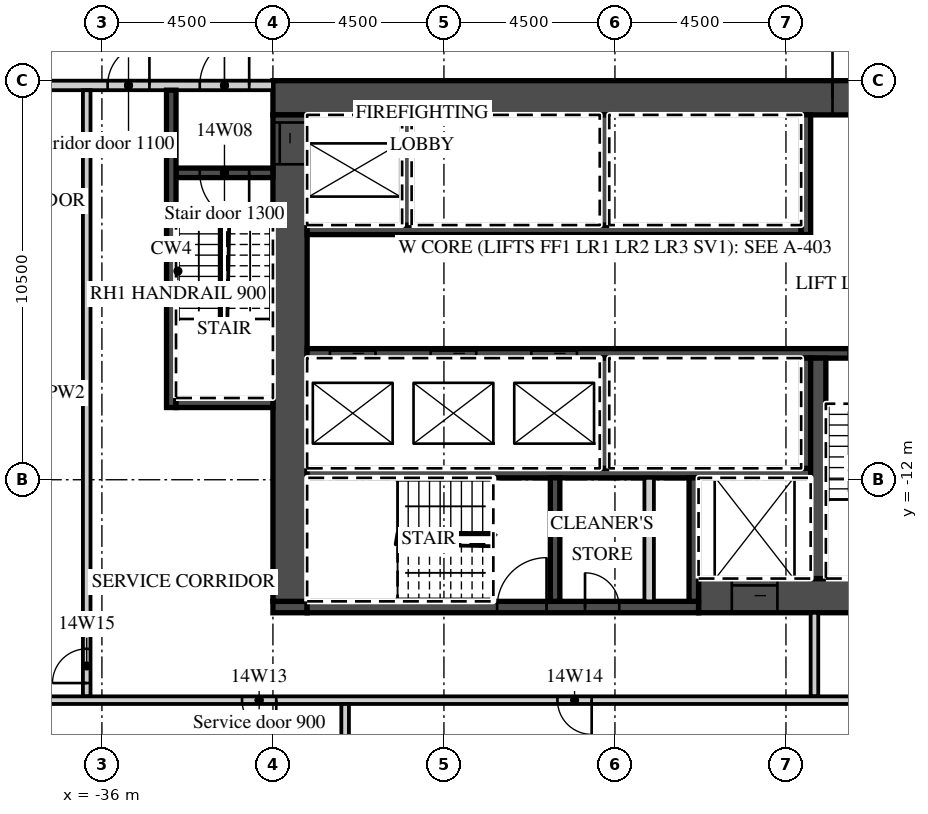
"""IFC4 building model, lengths in metres.
Left out: names, types, materials, properties, quantities, classifications, styles, units other than length and angle.
Written with IfcOpenShell. Run it as: python <this file> out.ifc"""

import sys

from ifc_helpers import new_model, si_unit, direction, frame, frame_2d, origin, place, context, subcontext, project, spatial, rectangle, extrude, element, fill, save


model = new_model("IFC4")
c1 = context("Model", 3, precision=1e-05, world=origin(), true_north=direction((0.0, 1.0)))
c2 = subcontext(c1, "Body", "Model", "MODEL_VIEW")
j1 = project(units=[si_unit("LENGTHUNIT", "METRE"), si_unit("PLANEANGLEUNIT", "RADIAN")], contexts=[c1])
p1 = place(None, origin())
s1 = spatial("IfcSite", under=j1, at=p1, CompositionType="ELEMENT")
p2 = place(p1, origin())
s2 = spatial("IfcBuilding", under=s1, at=p2, CompositionType="ELEMENT")
p3 = place(p2, frame((0.0, 0.0, 76.5)))
s3 = spatial("IfcBuildingStorey", under=s2, at=p3, CompositionType="ELEMENT", Elevation=76.5)
p4 = place(p3, frame((-31.5, -1.95, 0.0), z_axis=(0.0, 0.0, 1.0), x_axis=(1.0, 0.0, 0.0)))
e1 = element("IfcWall", 1, at=p4, inside=s3, PredefinedType="SHEAR", context=c2, shape_type="SweptSolid", body=[
    extrude(rectangle(XDim=18.0, YDim=0.9, at=frame_2d((9.0, 0.0))), origin(), (0.0, 0.0, 1.0), 3.02),
])
p5 = place(p4, frame((14.725, 0.0, 0.0)))
e2 = element("IfcOpeningElement", 2, at=p5, cuts=e1, PredefinedType="OPENING", context=c2, shape_type="SweptSolid", body=[
    extrude(rectangle(XDim=1.8, YDim=2.1, at=frame_2d((0.9, 1.05))), frame((0.0, 0.46, 0.0), z_axis=(0.0, -1.0, 0.0), x_axis=(1.0, 0.0, 0.0)), (0.0, 0.0, 1.0), 0.92),
])
p6 = place(p3, frame((-20.3, -15.05, 0.0), z_axis=(0.0, 0.0, 1.0), x_axis=(1.0, 0.0, 0.0)))
e3 = element("IfcWall", 3, at=p6, inside=s3, PredefinedType="SHEAR", context=c2, shape_type="SweptSolid", body=[
    extrude(rectangle(XDim=6.8, YDim=0.9, at=frame_2d((3.4, 0.0))), origin(), (0.0, 0.0, 1.0), 3.02),
])
p7 = place(p6, frame((0.875, 0.0, 0.0)))
e4 = element("IfcOpeningElement", 4, at=p7, cuts=e3, PredefinedType="OPENING", context=c2, shape_type="SweptSolid", body=[
    extrude(rectangle(XDim=1.2, YDim=2.1, at=frame_2d((0.6, 1.05))), frame((0.0, 0.46, 0.0), z_axis=(0.0, -1.0, 0.0), x_axis=(1.0, 0.0, 0.0)), (0.0, 0.0, 1.0), 0.92),
])
p8 = place(p3, frame((-31.5, -15.35, 0.0), z_axis=(0.0, 0.0, 1.0), x_axis=(1.0, 0.0, 0.0)))
e5 = element("IfcWall", 5, at=p8, inside=s3, PredefinedType="SHEAR", context=c2, shape_type="SweptSolid", body=[
    extrude(rectangle(XDim=0.9, YDim=0.3, at=frame_2d((0.45, 0.0))), origin(), (0.0, 0.0, 1.0), 3.02),
])
p9 = place(p3, frame((-30.6, -15.35, 0.0), z_axis=(0.0, 0.0, 1.0), x_axis=(1.0, 0.0, 0.0)))
e6 = element("IfcWall", 6, at=p9, inside=s3, PredefinedType="SHEAR", context=c2, shape_type="SweptSolid", body=[
    extrude(rectangle(XDim=10.3, YDim=0.3, at=frame_2d((5.15, 0.0))), origin(), (0.0, 0.0, 1.0), 3.02),
])
p10 = place(p9, frame((5.0, 0.0, 0.0)))
e7 = element("IfcOpeningElement", 7, at=p10, cuts=e6, PredefinedType="OPENING", context=c2, shape_type="SweptSolid", body=[
    extrude(rectangle(XDim=1.3, YDim=2.1, at=frame_2d((0.65, 1.05))), frame((0.0, 0.16, 0.0), z_axis=(0.0, -1.0, 0.0), x_axis=(1.0, 0.0, 0.0)), (0.0, 0.0, 1.0), 0.32),
])
p11 = place(p9, frame((7.312, 0.0, 0.0)))
e8 = element("IfcOpeningElement", 8, at=p11, cuts=e6, PredefinedType="OPENING", context=c2, shape_type="SweptSolid", body=[
    extrude(rectangle(XDim=0.9, YDim=2.1, at=frame_2d((0.45, 1.05))), frame((0.0, 0.16, 0.0), z_axis=(0.0, -1.0, 0.0), x_axis=(1.0, 0.0, 0.0)), (0.0, 0.0, 1.0), 0.32),
])
p12 = place(p3, frame((-31.05, -15.2, 0.0), z_axis=(0.0, 0.0, 1.0), x_axis=(0.0, 1.0, 0.0)))
e9 = element("IfcWall", 9, at=p12, inside=s3, PredefinedType="SHEAR", context=c2, shape_type="SweptSolid", body=[
    extrude(rectangle(XDim=12.8, YDim=0.9, at=frame_2d((6.4, 0.0))), origin(), (0.0, 0.0, 1.0), 3.02),
])
p13 = place(p12, frame((11.5, 0.0, 0.0)))
e10 = element("IfcOpeningElement", 10, at=p13, cuts=e9, PredefinedType="OPENING", context=c2, shape_type="SweptSolid", body=[
    extrude(rectangle(XDim=1.1, YDim=2.1, at=frame_2d((0.55, 1.05))), frame((0.0, 0.46, 0.0), z_axis=(0.0, -1.0, 0.0), x_axis=(1.0, 0.0, 0.0)), (0.0, 0.0, 1.0), 0.92),
])
p14 = place(p3, frame((-30.6, -5.425, 0.0), z_axis=(0.0, 0.0, 1.0), x_axis=(1.0, 0.0, 0.0)))
e11 = element("IfcWall", 11, at=p14, inside=s3, PredefinedType="SHEAR", context=c2, shape_type="SweptSolid", body=[
    extrude(rectangle(XDim=13.0, YDim=0.25, at=frame_2d((6.5, 0.0))), origin(), (0.0, 0.0, 1.0), 3.02),
])
p15 = place(p3, frame((-17.475, -5.55, 0.0), z_axis=(0.0, 0.0, 1.0), x_axis=(0.0, 1.0, 0.0)))
e12 = element("IfcWall", 12, at=p15, inside=s3, PredefinedType="SHEAR", context=c2, shape_type="SweptSolid", body=[
    extrude(rectangle(XDim=3.15, YDim=0.25, at=frame_2d((1.575, 0.0))), origin(), (0.0, 0.0, 1.0), 3.02),
])
for number, where, z_axis, x_axis in (
    (13, (-27.975, -5.3, 0.0), (0.0, 0.0, 1.0), (0.0, 1.0, 0.0)),
    (14, (-22.775, -5.3, 0.0), (0.0, 0.0, 1.0), (0.0, 1.0, 0.0)),
):
    element("IfcWall", number, at=place(p3, frame(where, z_axis=z_axis, x_axis=x_axis)), inside=s3, PredefinedType="SHEAR", context=c2, shape_type="SweptSolid", body=[
        extrude(rectangle(XDim=2.9, YDim=0.25, at=frame_2d((1.45, 0.0))), origin(), (0.0, 0.0, 1.0), 3.02),
    ])
p16 = place(p3, frame((-30.6, -8.675, 0.0), z_axis=(0.0, 0.0, 1.0), x_axis=(1.0, 0.0, 0.0)))
e15 = element("IfcWall", 15, at=p16, inside=s3, PredefinedType="SHEAR", context=c2, shape_type="SweptSolid", body=[
    extrude(rectangle(XDim=16.2, YDim=0.25, at=frame_2d((8.1, 0.0))), origin(), (0.0, 0.0, 1.0), 3.02),
])
p17 = place(p16, frame((0.6, 0.0, 0.0)))
e16 = element("IfcOpeningElement", 16, at=p17, cuts=e15, PredefinedType="OPENING", context=c2, shape_type="SweptSolid", body=[
    extrude(rectangle(XDim=1.2, YDim=2.1, at=frame_2d((0.6, 1.05))), frame((0.0, 0.135, 0.0), z_axis=(0.0, -1.0, 0.0), x_axis=(1.0, 0.0, 0.0)), (0.0, 0.0, 1.0), 0.27),
])
p18 = place(p16, frame((3.25, 0.0, 0.0)))
e17 = element("IfcOpeningElement", 17, at=p18, cuts=e15, PredefinedType="OPENING", context=c2, shape_type="SweptSolid", body=[
    extrude(rectangle(XDim=1.2, YDim=2.1, at=frame_2d((0.6, 1.05))), frame((0.0, 0.135, 0.0), z_axis=(0.0, -1.0, 0.0), x_axis=(1.0, 0.0, 0.0)), (0.0, 0.0, 1.0), 0.27),
])
p19 = place(p16, frame((5.9, 0.0, 0.0)))
e18 = element("IfcOpeningElement", 18, at=p19, cuts=e15, PredefinedType="OPENING", context=c2, shape_type="SweptSolid", body=[
    extrude(rectangle(XDim=1.2, YDim=2.1, at=frame_2d((0.6, 1.05))), frame((0.0, 0.135, 0.0), z_axis=(0.0, -1.0, 0.0), x_axis=(1.0, 0.0, 0.0)), (0.0, 0.0, 1.0), 0.27),
])
p20 = place(p16, frame((14.25, 0.0, 0.0)))
e19 = element("IfcOpeningElement", 19, at=p20, cuts=e15, PredefinedType="OPENING", context=c2, shape_type="SweptSolid", body=[
    extrude(rectangle(XDim=1.3, YDim=2.1, at=frame_2d((0.65, 1.05))), frame((0.0, 0.135, 0.0), z_axis=(0.0, -1.0, 0.0), x_axis=(1.0, 0.0, 0.0)), (0.0, 0.0, 1.0), 0.27),
])
p21 = place(p3, frame((-30.6, -11.825, 0.0), z_axis=(0.0, 0.0, 1.0), x_axis=(1.0, 0.0, 0.0)))
e20 = element("IfcWall", 20, at=p21, inside=s3, PredefinedType="SHEAR", context=c2, shape_type="SweptSolid", body=[
    extrude(rectangle(XDim=13.25, YDim=0.25, at=frame_2d((6.625, 0.0))), origin(), (0.0, 0.0, 1.0), 3.02),
])
for number, where, z_axis, x_axis in (
    (21, (-17.475, -11.7, 0.0), (0.0, 0.0, 1.0), (0.0, 1.0, 0.0)),
    (22, (-22.775, -11.7, 0.0), (0.0, 0.0, 1.0), (0.0, 1.0, 0.0)),
):
    element("IfcWall", number, at=place(p3, frame(where, z_axis=z_axis, x_axis=x_axis)), inside=s3, PredefinedType="SHEAR", context=c2, shape_type="SweptSolid", body=[
        extrude(rectangle(XDim=2.9, YDim=0.25, at=frame_2d((1.45, 0.0))), origin(), (0.0, 0.0, 1.0), 3.02),
    ])
p22 = place(p3, frame((-17.15, -14.6, 0.0), z_axis=(0.0, 0.0, 1.0), x_axis=(0.0, 1.0, 0.0)))
e23 = element("IfcWall", 23, at=p22, inside=s3, PredefinedType="SHEAR", context=c2, shape_type="SweptSolid", body=[
    extrude(rectangle(XDim=5.8, YDim=0.4, at=frame_2d((2.9, 0.0))), origin(), (0.0, 0.0, 1.0), 3.02),
])
for number, where, z_axis, x_axis in (
    (24, (-20.425, -15.2, 0.0), (0.0, 0.0, 1.0), (0.0, 1.0, 0.0)),
    (25, (-24.075, -15.2, 0.0), (0.0, 0.0, 1.0), (0.0, 1.0, 0.0)),
):
    element("IfcWall", number, at=place(p3, frame(where, z_axis=z_axis, x_axis=x_axis)), inside=s3, PredefinedType="SHEAR", context=c2, shape_type="SweptSolid", body=[
        extrude(rectangle(XDim=3.25, YDim=0.25, at=frame_2d((1.625, 0.0))), origin(), (0.0, 0.0, 1.0), 3.02),
    ])
p23 = place(p3, frame((-21.6, -15.2, 0.0), z_axis=(0.0, 0.0, 1.0), x_axis=(0.0, 1.0, 0.0)))
e26 = element("IfcWall", 26, at=p23, inside=s3, PredefinedType="PARTITIONING", context=c2, shape_type="SweptSolid", body=[
    extrude(rectangle(XDim=3.25, YDim=0.25, at=frame_2d((1.625, 0.0))), origin(), (0.0, 0.0, 1.0), 3.02),
])
p24 = place(p3, frame((-44.55, -1.625, 0.0), z_axis=(0.0, 0.0, 1.0), x_axis=(1.0, 0.0, 0.0)))
e27 = element("IfcWall", 27, at=p24, inside=s3, PredefinedType="PARTITIONING", context=c2, shape_type="SweptSolid", body=[
    extrude(rectangle(XDim=13.05, YDim=0.25, at=frame_2d((6.525, 0.0))), origin(), (0.0, 0.0, 1.0), 3.02),
])
p25 = place(p24, frame((11.125, 0.0, 0.0)))
e28 = element("IfcOpeningElement", 28, at=p25, cuts=e27, PredefinedType="OPENING", context=c2, shape_type="SweptSolid", body=[
    extrude(rectangle(XDim=1.3, YDim=2.1, at=frame_2d((0.65, 1.05))), frame((0.0, 0.135, 0.0), z_axis=(0.0, -1.0, 0.0), x_axis=(1.0, 0.0, 0.0)), (0.0, 0.0, 1.0), 0.27),
])
p26 = place(p24, frame((8.7, 0.0, 0.0)))
e29 = element("IfcOpeningElement", 29, at=p26, cuts=e27, PredefinedType="OPENING", context=c2, shape_type="SweptSolid", body=[
    extrude(rectangle(XDim=1.1, YDim=2.1, at=frame_2d((0.55, 1.05))), frame((0.0, 0.135, 0.0), z_axis=(0.0, -1.0, 0.0), x_axis=(1.0, 0.0, 0.0)), (0.0, 0.0, 1.0), 0.27),
])
p27 = place(p3, frame((-34.05, -3.925, 0.0), z_axis=(0.0, 0.0, 1.0), x_axis=(1.0, 0.0, 0.0)))
e30 = element("IfcWall", 30, at=p27, inside=s3, PredefinedType="SHEAR", context=c2, shape_type="SweptSolid", body=[
    extrude(rectangle(XDim=2.55, YDim=0.25, at=frame_2d((1.275, 0.0))), origin(), (0.0, 0.0, 1.0), 3.02),
])
p28 = place(p27, frame((0.625, 0.0, 0.0)))
e31 = element("IfcOpeningElement", 31, at=p28, cuts=e30, PredefinedType="OPENING", context=c2, shape_type="SweptSolid", body=[
    extrude(rectangle(XDim=1.3, YDim=2.1, at=frame_2d((0.65, 1.05))), frame((0.0, 0.135, 0.0), z_axis=(0.0, -1.0, 0.0), x_axis=(1.0, 0.0, 0.0)), (0.0, 0.0, 1.0), 0.27),
])
p29 = place(p3, frame((-34.175, -10.1, 0.0), z_axis=(0.0, 0.0, 1.0), x_axis=(0.0, 1.0, 0.0)))
e32 = element("IfcWall", 32, at=p29, inside=s3, PredefinedType="SHEAR", context=c2, shape_type="SweptSolid", body=[
    extrude(rectangle(XDim=8.35, YDim=0.25, at=frame_2d((4.175, 0.0))), origin(), (0.0, 0.0, 1.0), 3.02),
])
p30 = place(p3, frame((-34.05, -9.975, 0.0), z_axis=(0.0, 0.0, 1.0), x_axis=(1.0, 0.0, 0.0)))
e33 = element("IfcWall", 33, at=p30, inside=s3, PredefinedType="SHEAR", context=c2, shape_type="SweptSolid", body=[
    extrude(rectangle(XDim=2.55, YDim=0.25, at=frame_2d((1.275, 0.0))), origin(), (0.0, 0.0, 1.0), 3.02),
])
p31 = place(p3, frame((-17.25, -17.7, 0.0), z_axis=(0.0, 0.0, 1.0), x_axis=(0.0, 1.0, 0.0)))
e34 = element("IfcWall", 34, at=p31, inside=s3, PredefinedType="PARTITIONING", context=c2, shape_type="SweptSolid", body=[
    extrude(rectangle(XDim=2.2, YDim=0.2, at=frame_2d((1.1, 0.0))), origin(), (0.0, 0.0, 1.0), 3.02),
])
p32 = place(p3, frame((-36.4, -17.7, 0.0), z_axis=(0.0, 0.0, 1.0), x_axis=(0.0, 1.0, 0.0)))
e35 = element("IfcWall", 35, at=p32, inside=s3, PredefinedType="PARTITIONING", context=c2, shape_type="SweptSolid", body=[
    extrude(rectangle(XDim=15.95, YDim=0.2, at=frame_2d((7.975, 0.0))), origin(), (0.0, 0.0, 1.0), 3.02),
])
p33 = place(p32, frame((0.35, 0.0, 0.0)))
e36 = element("IfcOpeningElement", 36, at=p33, cuts=e35, PredefinedType="OPENING", context=c2, shape_type="SweptSolid", body=[
    extrude(rectangle(XDim=0.9, YDim=2.1, at=frame_2d((0.45, 1.05))), frame((0.0, 0.11, 0.0), z_axis=(0.0, -1.0, 0.0), x_axis=(1.0, 0.0, 0.0)), (0.0, 0.0, 1.0), 0.22),
])
p34 = place(p3, frame((-44.55, -17.8, 0.0), z_axis=(0.0, 0.0, 1.0), x_axis=(1.0, 0.0, 0.0)))
e37 = element("IfcWall", 37, at=p34, inside=s3, PredefinedType="PARTITIONING", context=c2, shape_type="SweptSolid", body=[
    extrude(rectangle(XDim=30.95, YDim=0.2, at=frame_2d((15.475, 0.0))), origin(), (0.0, 0.0, 1.0), 3.02),
])
p35 = place(p34, frame((12.238, 0.0, 0.0)))
e38 = element("IfcOpeningElement", 38, at=p35, cuts=e37, PredefinedType="OPENING", context=c2, shape_type="SweptSolid", body=[
    extrude(rectangle(XDim=0.9, YDim=2.1, at=frame_2d((0.45, 1.05))), frame((0.0, 0.11, 0.0), z_axis=(0.0, -1.0, 0.0), x_axis=(1.0, 0.0, 0.0)), (0.0, 0.0, 1.0), 0.22),
])
p36 = place(p34, frame((20.538, 0.0, 0.0)))
e39 = element("IfcOpeningElement", 39, at=p36, cuts=e37, PredefinedType="OPENING", context=c2, shape_type="SweptSolid", body=[
    extrude(rectangle(XDim=0.9, YDim=2.1, at=frame_2d((0.45, 1.05))), frame((0.0, 0.11, 0.0), z_axis=(0.0, -1.0, 0.0), x_axis=(1.0, 0.0, 0.0)), (0.0, 0.0, 1.0), 0.22),
])
p37 = place(p3, frame((-29.6, -21.55, 0.0), z_axis=(0.0, 0.0, 1.0), x_axis=(0.0, 1.0, 0.0)))
e40 = element("IfcWall", 40, at=p37, inside=s3, PredefinedType="PARTITIONING", context=c2, shape_type="SweptSolid", body=[
    extrude(rectangle(XDim=3.65, YDim=0.2, at=frame_2d((1.825, 0.0))), origin(), (0.0, 0.0, 1.0), 3.02),
])
p38 = place(p17, origin())
e41 = element("IfcDoor", 41, at=p38, inside=s3, OperationType="SLIDING_TO_LEFT", PredefinedType="DOOR", context=c2, shape_type="SweptSolid", body=[
    extrude(rectangle(XDim=1.2, YDim=2.1, at=frame_2d((0.6, 1.05))), frame((0.0, 0.025, 0.0), z_axis=(0.0, -1.0, 0.0), x_axis=(1.0, 0.0, 0.0)), (0.0, 0.0, 1.0), 0.05),
])
fill(e16, e41)
p39 = place(p18, origin())
e42 = element("IfcDoor", 42, at=p39, inside=s3, OperationType="SLIDING_TO_RIGHT", PredefinedType="DOOR", context=c2, shape_type="SweptSolid", body=[
    extrude(rectangle(XDim=1.2, YDim=2.1, at=frame_2d((0.6, 1.05))), frame((0.0, 0.025, 0.0), z_axis=(0.0, -1.0, 0.0), x_axis=(1.0, 0.0, 0.0)), (0.0, 0.0, 1.0), 0.05),
])
fill(e17, e42)
p40 = place(p19, origin())
e43 = element("IfcDoor", 43, at=p40, inside=s3, OperationType="SLIDING_TO_RIGHT", PredefinedType="DOOR", context=c2, shape_type="SweptSolid", body=[
    extrude(rectangle(XDim=1.2, YDim=2.1, at=frame_2d((0.6, 1.05))), frame((0.0, 0.025, 0.0), z_axis=(0.0, -1.0, 0.0), x_axis=(1.0, 0.0, 0.0)), (0.0, 0.0, 1.0), 0.05),
])
fill(e18, e43)
p41 = place(p7, origin())
e44 = element("IfcDoor", 44, at=p41, inside=s3, OperationType="SLIDING_TO_LEFT", PredefinedType="DOOR", context=c2, shape_type="SweptSolid", body=[
    extrude(rectangle(XDim=1.2, YDim=2.1, at=frame_2d((0.6, 1.05))), frame((0.0, 0.025, 0.0), z_axis=(0.0, -1.0, 0.0), x_axis=(1.0, 0.0, 0.0)), (0.0, 0.0, 1.0), 0.05),
])
fill(e4, e44)
p42 = place(p13, origin())
e45 = element("IfcDoor", 45, at=p42, inside=s3, OperationType="SLIDING_TO_RIGHT", PredefinedType="DOOR", context=c2, shape_type="SweptSolid", body=[
    extrude(rectangle(XDim=1.1, YDim=2.1, at=frame_2d((0.55, 1.05))), frame((0.0, 0.025, 0.0), z_axis=(0.0, -1.0, 0.0), x_axis=(1.0, 0.0, 0.0)), (0.0, 0.0, 1.0), 0.05),
])
fill(e10, e45)
p43 = place(p5, origin())
e46 = element("IfcDoor", 46, at=p43, inside=s3, OperationType="DOUBLE_DOOR_DOUBLE_SWING", PredefinedType="DOOR", context=c2, shape_type="SweptSolid", body=[
    extrude(rectangle(XDim=1.8, YDim=2.1, at=frame_2d((0.9, 1.05))), frame((0.0, 0.025, 0.0), z_axis=(0.0, -1.0, 0.0), x_axis=(1.0, 0.0, 0.0)), (0.0, 0.0, 1.0), 0.05),
])
fill(e2, e46)
p44 = place(p25, origin())
e47 = element("IfcDoor", 47, at=p44, inside=s3, OperationType="SINGLE_SWING_RIGHT", PredefinedType="DOOR", context=c2, shape_type="SweptSolid", body=[
    extrude(rectangle(XDim=1.3, YDim=2.1, at=frame_2d((0.65, 1.05))), frame((0.0, 0.025, 0.0), z_axis=(0.0, -1.0, 0.0), x_axis=(1.0, 0.0, 0.0)), (0.0, 0.0, 1.0), 0.05),
])
fill(e28, e47)
p45 = place(p28, origin())
e48 = element("IfcDoor", 48, at=p45, inside=s3, OperationType="SINGLE_SWING_RIGHT", PredefinedType="DOOR", context=c2, shape_type="SweptSolid", body=[
    extrude(rectangle(XDim=1.3, YDim=2.1, at=frame_2d((0.65, 1.05))), frame((0.0, 0.025, 0.0), z_axis=(0.0, -1.0, 0.0), x_axis=(1.0, 0.0, 0.0)), (0.0, 0.0, 1.0), 0.05),
])
fill(e31, e48)
p46 = place(p26, origin())
e49 = element("IfcDoor", 49, at=p46, inside=s3, OperationType="SINGLE_SWING_RIGHT", PredefinedType="DOOR", context=c2, shape_type="SweptSolid", body=[
    extrude(rectangle(XDim=1.1, YDim=2.1, at=frame_2d((0.55, 1.05))), frame((0.0, 0.025, 0.0), z_axis=(0.0, -1.0, 0.0), x_axis=(1.0, 0.0, 0.0)), (0.0, 0.0, 1.0), 0.05),
])
fill(e29, e49)
p47 = place(p20, origin())
e50 = element("IfcDoor", 50, at=p47, inside=s3, OperationType="SINGLE_SWING_RIGHT", PredefinedType="DOOR", context=c2, shape_type="SweptSolid", body=[
    extrude(rectangle(XDim=1.3, YDim=2.1, at=frame_2d((0.65, 1.05))), frame((0.0, 0.025, 0.0), z_axis=(0.0, -1.0, 0.0), x_axis=(1.0, 0.0, 0.0)), (0.0, 0.0, 1.0), 0.05),
])
fill(e19, e50)
p48 = place(p10, origin())
e51 = element("IfcDoor", 51, at=p48, inside=s3, OperationType="SINGLE_SWING_RIGHT", PredefinedType="DOOR", context=c2, shape_type="SweptSolid", body=[
    extrude(rectangle(XDim=1.3, YDim=2.1, at=frame_2d((0.65, 1.05))), frame((0.0, 0.025, 0.0), z_axis=(0.0, -1.0, 0.0), x_axis=(1.0, 0.0, 0.0)), (0.0, 0.0, 1.0), 0.05),
])
fill(e7, e51)
p49 = place(p11, origin())
e52 = element("IfcDoor", 52, at=p49, inside=s3, OperationType="SINGLE_SWING_LEFT", PredefinedType="DOOR", context=c2, shape_type="SweptSolid", body=[
    extrude(rectangle(XDim=0.9, YDim=2.1, at=frame_2d((0.45, 1.05))), frame((0.0, 0.025, 0.0), z_axis=(0.0, -1.0, 0.0), x_axis=(1.0, 0.0, 0.0)), (0.0, 0.0, 1.0), 0.05),
])
fill(e8, e52)
p50 = place(p35, origin())
e53 = element("IfcDoor", 53, at=p50, inside=s3, OperationType="SINGLE_SWING_RIGHT", PredefinedType="DOOR", context=c2, shape_type="SweptSolid", body=[
    extrude(rectangle(XDim=0.9, YDim=2.1, at=frame_2d((0.45, 1.05))), frame((0.0, 0.025, 0.0), z_axis=(0.0, -1.0, 0.0), x_axis=(1.0, 0.0, 0.0)), (0.0, 0.0, 1.0), 0.05),
])
fill(e38, e53)
p51 = place(p36, origin())
e54 = element("IfcDoor", 54, at=p51, inside=s3, OperationType="SINGLE_SWING_RIGHT", PredefinedType="DOOR", context=c2, shape_type="SweptSolid", body=[
    extrude(rectangle(XDim=0.9, YDim=2.1, at=frame_2d((0.45, 1.05))), frame((0.0, 0.025, 0.0), z_axis=(0.0, -1.0, 0.0), x_axis=(1.0, 0.0, 0.0)), (0.0, 0.0, 1.0), 0.05),
])
fill(e39, e54)
p52 = place(p33, origin())
e55 = element("IfcDoor", 55, at=p52, inside=s3, OperationType="SINGLE_SWING_LEFT", PredefinedType="DOOR", context=c2, shape_type="SweptSolid", body=[
    extrude(rectangle(XDim=0.9, YDim=2.1, at=frame_2d((0.45, 1.05))), frame((0.0, 0.025, 0.0), z_axis=(0.0, -1.0, 0.0), x_axis=(1.0, 0.0, 0.0)), (0.0, 0.0, 1.0), 0.05),
])
fill(e36, e55)
save(model, sys.argv[1])
